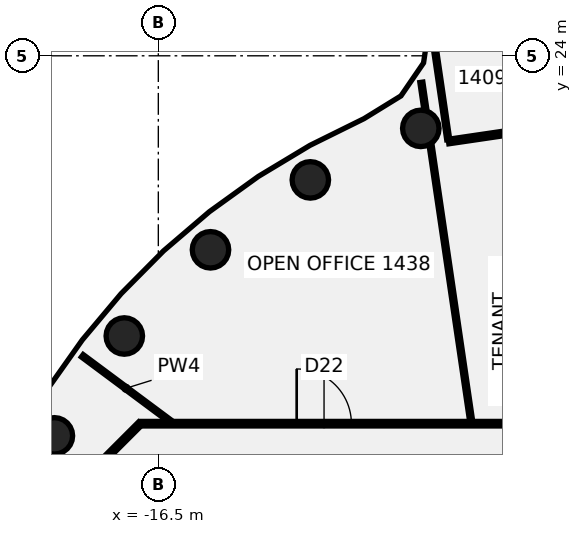
"""IFC4 building model, lengths in metres.
Left out: names, types, materials, properties, quantities, classifications, styles, units other than length and angle.
Written with IfcOpenShell. Run it as: python <this file> out.ifc"""

import sys

from ifc_helpers import new_model, si_unit, direction, frame, frame_2d, origin, origin_2d, place, context, subcontext, project, spatial, rectangle, circle, extrude, element, fill, save


model = new_model("IFC4")
c1 = context("Model", 3, precision=1e-05, world=origin(), true_north=direction((0.0, 1.0)))
c2 = subcontext(c1, "Body", "Model", "MODEL_VIEW")
j1 = project(units=[si_unit("LENGTHUNIT", "METRE"), si_unit("PLANEANGLEUNIT", "RADIAN")], contexts=[c1])
p1 = place(None, origin())
s1 = spatial("IfcSite", under=j1, at=p1, CompositionType="ELEMENT")
p2 = place(p1, origin())
s2 = spatial("IfcBuilding", under=s1, at=p2, CompositionType="ELEMENT")
p3 = place(p2, frame((0.0, 0.0, 64.0)))
s3 = spatial("IfcBuildingStorey", under=s2, at=p3, CompositionType="ELEMENT", Elevation=64.0)
for number, where, z_axis, x_axis in (
    (1, (-7.866, 21.613, -0.14), (0.0, 0.0, 1.0), (1.0, 0.0, 0.0)),
    (2, (-11.5, 19.919, -0.14), (0.0, 0.0, 1.0), (1.0, 0.0, 0.0)),
    (3, (-14.784, 17.619, -0.14), (0.0, 0.0, 1.0), (1.0, 0.0, 0.0)),
    (4, (-17.619, 14.784, -0.14), (0.0, 0.0, 1.0), (1.0, 0.0, 0.0)),
    (5, (-19.919, 11.5, -0.14), (0.0, 0.0, 1.0), (1.0, 0.0, 0.0)),
):
    element("IfcColumn", number, at=place(p3, frame(where, z_axis=z_axis, x_axis=x_axis)), inside=s3, PredefinedType="COLUMN", context=c2, shape_type="SweptSolid", body=[
        extrude(circle(Radius=0.6, at=origin_2d()), origin(), (0.0, 0.0, 1.0), 3.75),
    ])
p4 = place(p3, frame((-7.848, 23.128, 0.0), z_axis=(0.0, 0.0, 1.0), x_axis=(0.145310506954, -0.989386100857, 0.0)))
e6 = element("IfcWall", 6, at=p4, inside=s3, PredefinedType="PARTITIONING", context=c2, shape_type="SweptSolid", body=[
    extrude(rectangle(XDim=0.958, YDim=0.1, at=frame_2d((0.479, 0.0))), origin(), (0.0, 0.0, 1.0), 3.01),
])
p5 = place(p3, frame((-7.549, 21.097, 0.0), z_axis=(0.0, 0.0, 1.0), x_axis=(0.145367586138, -0.989377715991, 0.0)))
e7 = element("IfcWall", 7, at=p5, inside=s3, PredefinedType="PARTITIONING", context=c2, shape_type="SweptSolid", body=[
    extrude(rectangle(XDim=9.23, YDim=0.1, at=frame_2d((4.615, 0.0))), origin(), (0.0, 0.0, 1.0), 3.01),
])
p6 = place(p3, frame((-7.403, 24.234, 0.0), z_axis=(0.0, 0.0, 1.0), x_axis=(0.145198559195, -0.989402536083, 0.0)))
e8 = element("IfcWall", 8, at=p6, inside=s3, PredefinedType="PARTITIONING", context=c2, shape_type="SweptSolid", body=[
    extrude(rectangle(XDim=3.021, YDim=0.1, at=frame_2d((1.511, 0.0))), origin(), (0.0, 0.0, 1.0), 3.01),
])
p7 = place(p3, frame((-19.001, 14.133, 0.0), z_axis=(0.0, 0.0, 1.0), x_axis=(0.802357716304, -0.596843442695, 0.0)))
e9 = element("IfcWall", 9, at=p7, inside=s3, PredefinedType="PARTITIONING", context=c2, shape_type="SweptSolid", body=[
    extrude(rectangle(XDim=3.582, YDim=0.1, at=frame_2d((1.791, 0.0))), origin(), (0.0, 0.0, 1.0), 3.01),
])
p8 = place(p3, frame((-17.065, 11.9, 0.0), z_axis=(0.0, 0.0, 1.0), x_axis=(1.0, 0.0, 0.0)))
e10 = element("IfcWall", 10, at=p8, inside=s3, PredefinedType="PARTITIONING", context=c2, shape_type="SweptSolid", body=[
    extrude(rectangle(XDim=34.165, YDim=0.15, at=frame_2d((17.083, 0.0))), origin(), (0.0, 0.0, 1.0), 3.01),
])
p9 = place(p8, frame((17.662, 0.0, 0.0)))
e11 = element("IfcOpeningElement", 11, at=p9, cuts=e10, PredefinedType="OPENING", context=c2, shape_type="SweptSolid", body=[
    extrude(rectangle(XDim=1.8, YDim=2.1, at=frame_2d((0.9, 1.05))), frame((0.0, 0.085, 0.0), z_axis=(0.0, -1.0, 0.0), x_axis=(1.0, 0.0, 0.0)), (0.0, 0.0, 1.0), 0.17),
])
p10 = place(p8, frame((30.131, 0.0, 0.0)))
e12 = element("IfcOpeningElement", 12, at=p10, cuts=e10, PredefinedType="OPENING", context=c2, shape_type="SweptSolid", body=[
    extrude(rectangle(XDim=1.8, YDim=2.1, at=frame_2d((0.9, 1.05))), frame((0.0, 0.085, 0.0), z_axis=(0.0, -1.0, 0.0), x_axis=(1.0, 0.0, 0.0)), (0.0, 0.0, 1.0), 0.17),
])
p11 = place(p8, frame((5.116, 0.0, 0.0)))
e13 = element("IfcOpeningElement", 13, at=p11, cuts=e10, PredefinedType="OPENING", context=c2, shape_type="SweptSolid", body=[
    extrude(rectangle(XDim=1.8, YDim=2.1, at=frame_2d((0.9, 1.05))), frame((0.0, 0.085, 0.0), z_axis=(0.0, -1.0, 0.0), x_axis=(1.0, 0.0, 0.0)), (0.0, 0.0, 1.0), 0.17),
])
p12 = place(p3, frame((-6.955, 21.18, 0.0), z_axis=(0.0, 0.0, 1.0), x_axis=(0.989351383004, 0.145546696796, 0.0)))
e14 = element("IfcWall", 14, at=p12, inside=s3, PredefinedType="PARTITIONING", context=c2, shape_type="SweptSolid", body=[
    extrude(rectangle(XDim=4.0, YDim=0.15, at=frame_2d((2.0, 0.0))), origin(), (0.0, 0.0, 1.0), 3.01),
])
p13 = place(p3, frame((-18.872, 10.128, 0.0), z_axis=(0.0, 0.0, 1.0), x_axis=(0.707106781187, 0.707106781187, 0.0)))
e15 = element("IfcWall", 15, at=p13, inside=s3, PredefinedType="PARTITIONING", context=c2, shape_type="SweptSolid", body=[
    extrude(rectangle(XDim=2.505, YDim=0.15, at=frame_2d((1.253, 0.0))), origin(), (0.0, 0.0, 1.0), 3.01),
])
p14 = place(p11, origin())
e16 = element("IfcDoor", 16, at=p14, inside=s3, OperationType="DOUBLE_DOOR_SINGLE_SWING", PredefinedType="DOOR", context=c2, shape_type="SweptSolid", body=[
    extrude(rectangle(XDim=1.8, YDim=2.1, at=frame_2d((0.9, 1.05))), frame((0.0, 0.025, 0.0), z_axis=(0.0, -1.0, 0.0), x_axis=(1.0, 0.0, 0.0)), (0.0, 0.0, 1.0), 0.05),
])
fill(e13, e16)
save(model, sys.argv[1])
